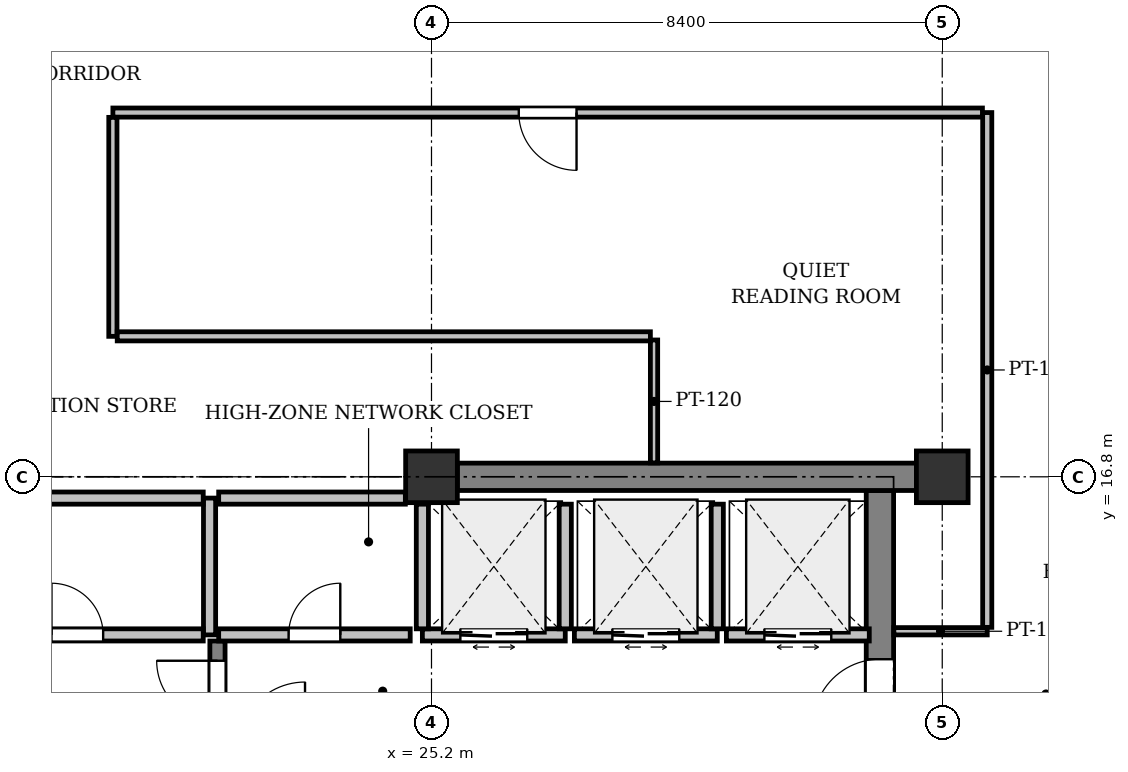
"""IFC4 building model, lengths in metres.
Left out: names, types, materials, properties, quantities, classifications, styles, units other than length and angle.
Written with IfcOpenShell. Run it as: python <this file> out.ifc"""

import sys

from ifc_helpers import new_model, si_unit, direction, frame, frame_2d, origin, origin_2d, place, context, subcontext, project, spatial, rectangle, extrude, element, fill, save


model = new_model("IFC4")
c1 = context("Model", 3, precision=1e-05, world=origin(), true_north=direction((0.0, 1.0)))
c2 = subcontext(c1, "Body", "Model", "MODEL_VIEW")
j1 = project(units=[si_unit("LENGTHUNIT", "METRE"), si_unit("PLANEANGLEUNIT", "RADIAN")], contexts=[c1])
p1 = place(None, origin())
s1 = spatial("IfcSite", under=j1, at=p1, CompositionType="ELEMENT")
p2 = place(p1, origin())
s2 = spatial("IfcBuilding", under=s1, at=p2, CompositionType="ELEMENT")
p3 = place(p2, frame((0.0, 0.0, 274.2)))
s3 = spatial("IfcBuildingStorey", under=s2, at=p3, CompositionType="ELEMENT", Elevation=274.2)
for number, where, z_axis, x_axis in (
    (1, (25.2, 16.8, 0.0), (0.0, 0.0, 1.0), (1.0, 0.0, 0.0)),
    (2, (33.6, 16.8, 0.0), (0.0, 0.0, 1.0), (1.0, 0.0, 0.0)),
):
    element("IfcColumn", number, at=place(p3, frame(where, z_axis=z_axis, x_axis=x_axis)), inside=s3, PredefinedType="COLUMN", context=c2, shape_type="SweptSolid", body=[
        extrude(rectangle(XDim=0.85, YDim=0.85, at=origin_2d()), origin(), (0.0, 0.0, 1.0), 4.0),
    ])
p4 = place(p3, frame((32.575, 8.625, 0.0), z_axis=(0.0, 0.0, 1.0), x_axis=(0.0, 1.0, 0.0)))
e3 = element("IfcWall", 3, at=p4, inside=s3, PredefinedType="SHEAR", context=c2, shape_type="SweptSolid", body=[
    extrude(rectangle(XDim=7.95, YDim=0.45, at=frame_2d((3.975, 0.0))), origin(), (0.0, 0.0, 1.0), 3.725),
])
p5 = place(p4, frame((4.075, 0.0, 0.0)))
e4 = element("IfcOpeningElement", 4, at=p5, cuts=e3, PredefinedType="OPENING", context=c2, shape_type="SweptSolid", body=[
    extrude(rectangle(XDim=1.1, YDim=2.15, at=frame_2d((0.55, 1.075))), frame((0.0, 0.235, 0.0), z_axis=(0.0, -1.0, 0.0), x_axis=(1.0, 0.0, 0.0)), (0.0, 0.0, 1.0), 0.47),
])
p6 = place(p3, frame((25.625, 16.8, 0.0), z_axis=(0.0, 0.0, 1.0), x_axis=(1.0, 0.0, 0.0)))
e5 = element("IfcWall", 5, at=p6, inside=s3, PredefinedType="SHEAR", context=c2, shape_type="SweptSolid", body=[
    extrude(rectangle(XDim=7.55, YDim=0.45, at=frame_2d((3.775, 0.0))), origin(), (0.0, 0.0, 1.0), 3.725),
])
p7 = place(p3, frame((21.68, 12.45, 0.0), z_axis=(0.0, 0.0, 1.0), x_axis=(0.0, 1.0, 0.0)))
e6 = element("IfcWall", 6, at=p7, inside=s3, PredefinedType="SHEAR", context=c2, shape_type="SweptSolid", body=[
    extrude(rectangle(XDim=1.65, YDim=0.25, at=frame_2d((0.825, 0.0))), origin(), (0.0, 0.0, 1.0), 3.725),
])
p8 = place(p7, frame((0.325, 0.0, 0.0)))
e7 = element("IfcOpeningElement", 7, at=p8, cuts=e6, PredefinedType="OPENING", context=c2, shape_type="SweptSolid", body=[
    extrude(rectangle(XDim=1.0, YDim=2.15, at=frame_2d((0.5, 1.075))), frame((0.0, 0.135, 0.0), z_axis=(0.0, -1.0, 0.0), x_axis=(1.0, 0.0, 0.0)), (0.0, 0.0, 1.0), 0.27),
])
p9 = place(p3, frame((25.05, 14.2, 0.0), z_axis=(0.0, 0.0, 1.0), x_axis=(1.0, 0.0, 0.0)))
e8 = element("IfcWall", 8, at=p9, inside=s3, PredefinedType="PARTITIONING", context=c2, shape_type="SweptSolid", body=[
    extrude(rectangle(XDim=2.35, YDim=0.2, at=frame_2d((1.175, 0.0))), origin(), (0.0, 0.0, 1.0), 3.725),
])
p10 = place(p9, frame((0.625, 0.0, 0.0)))
e9 = element("IfcOpeningElement", 9, at=p10, cuts=e8, PredefinedType="OPENING", context=c2, shape_type="SweptSolid", body=[
    extrude(rectangle(XDim=1.1, YDim=2.2, at=frame_2d((0.55, 1.1))), frame((0.0, 0.11, 0.0), z_axis=(0.0, -1.0, 0.0), x_axis=(1.0, 0.0, 0.0)), (0.0, 0.0, 1.0), 0.22),
])
for number, where, z_axis, x_axis in (
    (10, (27.4, 14.3, 0.0), (0.0, 0.0, 1.0), (0.0, 1.0, 0.0)),
    (11, (25.05, 14.3, 0.0), (0.0, 0.0, 1.0), (0.0, 1.0, 0.0)),
):
    element("IfcWall", number, at=place(p3, frame(where, z_axis=z_axis, x_axis=x_axis)), inside=s3, PredefinedType="PARTITIONING", context=c2, shape_type="SweptSolid", body=[
        extrude(rectangle(XDim=2.05, YDim=0.2, at=frame_2d((1.025, 0.0))), origin(), (0.0, 0.0, 1.0), 3.725),
    ])
p11 = place(p3, frame((27.55, 14.2, 0.0), z_axis=(0.0, 0.0, 1.0), x_axis=(1.0, 0.0, 0.0)))
e12 = element("IfcWall", 12, at=p11, inside=s3, PredefinedType="PARTITIONING", context=c2, shape_type="SweptSolid", body=[
    extrude(rectangle(XDim=2.35, YDim=0.2, at=frame_2d((1.175, 0.0))), origin(), (0.0, 0.0, 1.0), 3.725),
])
p12 = place(p11, frame((0.625, 0.0, 0.0)))
e13 = element("IfcOpeningElement", 13, at=p12, cuts=e12, PredefinedType="OPENING", context=c2, shape_type="SweptSolid", body=[
    extrude(rectangle(XDim=1.1, YDim=2.2, at=frame_2d((0.55, 1.1))), frame((0.0, 0.11, 0.0), z_axis=(0.0, -1.0, 0.0), x_axis=(1.0, 0.0, 0.0)), (0.0, 0.0, 1.0), 0.22),
])
p13 = place(p3, frame((29.9, 14.3, 0.0), z_axis=(0.0, 0.0, 1.0), x_axis=(0.0, 1.0, 0.0)))
e14 = element("IfcWall", 14, at=p13, inside=s3, PredefinedType="PARTITIONING", context=c2, shape_type="SweptSolid", body=[
    extrude(rectangle(XDim=2.05, YDim=0.2, at=frame_2d((1.025, 0.0))), origin(), (0.0, 0.0, 1.0), 3.725),
])
p14 = place(p3, frame((30.05, 14.2, 0.0), z_axis=(0.0, 0.0, 1.0), x_axis=(1.0, 0.0, 0.0)))
e15 = element("IfcWall", 15, at=p14, inside=s3, PredefinedType="PARTITIONING", context=c2, shape_type="SweptSolid", body=[
    extrude(rectangle(XDim=2.35, YDim=0.2, at=frame_2d((1.175, 0.0))), origin(), (0.0, 0.0, 1.0), 3.725),
])
p15 = place(p14, frame((0.625, 0.0, 0.0)))
e16 = element("IfcOpeningElement", 16, at=p15, cuts=e15, PredefinedType="OPENING", context=c2, shape_type="SweptSolid", body=[
    extrude(rectangle(XDim=1.1, YDim=2.2, at=frame_2d((0.55, 1.1))), frame((0.0, 0.11, 0.0), z_axis=(0.0, -1.0, 0.0), x_axis=(1.0, 0.0, 0.0)), (0.0, 0.0, 1.0), 0.22),
])
p16 = place(p3, frame((21.55, 14.2, 0.0), z_axis=(0.0, 0.0, 1.0), x_axis=(0.0, 1.0, 0.0)))
e17 = element("IfcWall", 17, at=p16, inside=s3, PredefinedType="PARTITIONING", context=c2, shape_type="SweptSolid", body=[
    extrude(rectangle(XDim=2.25, YDim=0.2, at=frame_2d((1.125, 0.0))), origin(), (0.0, 0.0, 1.0), 3.725),
])
p17 = place(p3, frame((21.446, 16.45, 0.0), z_axis=(0.0, 0.0, 1.0), x_axis=(-1.0, 0.0, 0.0)))
e18 = element("IfcWall", 18, at=p17, inside=s3, PredefinedType="PARTITIONING", context=c2, shape_type="SweptSolid", body=[
    extrude(rectangle(XDim=4.216, YDim=0.2, at=frame_2d((2.108, 0.0))), origin(), (0.0, 0.0, 1.0), 3.725),
])
p18 = place(p3, frame((17.304, 14.2, 0.0), z_axis=(0.0, 0.0, 1.0), x_axis=(1.0, 0.0, 0.0)))
e19 = element("IfcWall", 19, at=p18, inside=s3, PredefinedType="PARTITIONING", context=c2, shape_type="SweptSolid", body=[
    extrude(rectangle(XDim=4.142, YDim=0.2, at=frame_2d((2.071, 0.0))), origin(), (0.0, 0.0, 1.0), 3.725),
])
p19 = place(p18, frame((1.646, 0.0, 0.0)))
e20 = element("IfcOpeningElement", 20, at=p19, cuts=e19, PredefinedType="OPENING", context=c2, shape_type="SweptSolid", body=[
    extrude(rectangle(XDim=0.85, YDim=2.15, at=frame_2d((0.425, 1.075))), frame((0.0, 0.11, 0.0), z_axis=(0.0, -1.0, 0.0), x_axis=(1.0, 0.0, 0.0)), (0.0, 0.0, 1.0), 0.22),
])
p20 = place(p3, frame((24.77, 16.45, 0.0), z_axis=(0.0, 0.0, 1.0), x_axis=(-1.0, 0.0, 0.0)))
e21 = element("IfcWall", 21, at=p20, inside=s3, PredefinedType="PARTITIONING", context=c2, shape_type="SweptSolid", body=[
    extrude(rectangle(XDim=3.07, YDim=0.2, at=frame_2d((1.535, 0.0))), origin(), (0.0, 0.0, 1.0), 3.725),
])
p21 = place(p3, frame((21.7, 14.2, 0.0), z_axis=(0.0, 0.0, 1.0), x_axis=(1.0, 0.0, 0.0)))
e22 = element("IfcWall", 22, at=p21, inside=s3, PredefinedType="PARTITIONING", context=c2, shape_type="SweptSolid", body=[
    extrude(rectangle(XDim=3.15, YDim=0.2, at=frame_2d((1.575, 0.0))), origin(), (0.0, 0.0, 1.0), 3.725),
])
p22 = place(p21, frame((1.15, 0.0, 0.0)))
e23 = element("IfcOpeningElement", 23, at=p22, cuts=e22, PredefinedType="OPENING", context=c2, shape_type="SweptSolid", body=[
    extrude(rectangle(XDim=0.85, YDim=2.15, at=frame_2d((0.425, 1.075))), frame((0.0, 0.11, 0.0), z_axis=(0.0, -1.0, 0.0), x_axis=(1.0, 0.0, 0.0)), (0.0, 0.0, 1.0), 0.22),
])
p23 = place(p3, frame((28.86, 19.05, 0.0), z_axis=(0.0, 0.0, 1.0), x_axis=(0.0, -1.0, 0.0)))
e24 = element("IfcWall", 24, at=p23, inside=s3, PredefinedType="PARTITIONING", context=c2, shape_type="SweptSolid", body=[
    extrude(rectangle(XDim=2.021, YDim=0.12, at=frame_2d((1.01, 0.0))), origin(), (0.0, 0.0, 1.0), 3.725),
])
p24 = place(p3, frame((32.804, 14.26, 0.0), z_axis=(0.0, 0.0, 1.0), x_axis=(1.0, 0.0, 0.0)))
e25 = element("IfcWall", 25, at=p24, inside=s3, PredefinedType="PARTITIONING", context=c2, shape_type="SweptSolid", body=[
    extrude(rectangle(XDim=1.536, YDim=0.12, at=frame_2d((0.768, 0.0))), origin(), (0.0, 0.0, 1.0), 3.319),
])
p25 = place(p3, frame((34.34, 14.324, 0.0), z_axis=(0.0, 0.0, 1.0), x_axis=(0.0, 1.0, 0.0)))
e26 = element("IfcWall", 26, at=p25, inside=s3, PredefinedType="PARTITIONING", context=c2, shape_type="SweptSolid", body=[
    extrude(rectangle(XDim=8.466, YDim=0.15, at=frame_2d((4.233, 0.0))), origin(), (0.0, 0.0, 1.0), 3.271),
])
p26 = place(p3, frame((34.261, 22.79, 0.0), z_axis=(0.0, 0.0, 1.0), x_axis=(-1.0, 0.0, 0.0)))
e27 = element("IfcWall", 27, at=p26, inside=s3, PredefinedType="PARTITIONING", context=c2, shape_type="SweptSolid", body=[
    extrude(rectangle(XDim=14.301, YDim=0.15, at=frame_2d((7.15, 0.0))), origin(), (0.0, 0.0, 1.0), 3.319),
])
p27 = place(p26, frame((6.676, 0.0, 0.0)))
e28 = element("IfcOpeningElement", 28, at=p27, cuts=e27, PredefinedType="OPENING", context=c2, shape_type="SweptSolid", body=[
    extrude(rectangle(XDim=0.95, YDim=2.15, at=frame_2d((0.475, 1.075))), frame((0.0, 0.085, 0.0), z_axis=(0.0, -1.0, 0.0), x_axis=(1.0, 0.0, 0.0)), (0.0, 0.0, 1.0), 0.17),
])
p28 = place(p3, frame((19.96, 22.711, 0.0), z_axis=(0.0, 0.0, 1.0), x_axis=(0.0, -1.0, 0.0)))
e29 = element("IfcWall", 29, at=p28, inside=s3, PredefinedType="PARTITIONING", context=c2, shape_type="SweptSolid", body=[
    extrude(rectangle(XDim=3.601, YDim=0.135, at=frame_2d((1.8, 0.0))), origin(), (0.0, 0.0, 1.0), 3.725),
])
p29 = place(p3, frame((20.031, 19.11, 0.0), z_axis=(0.0, 0.0, 1.0), x_axis=(1.0, 0.0, 0.0)))
e30 = element("IfcWall", 30, at=p29, inside=s3, PredefinedType="PARTITIONING", context=c2, shape_type="SweptSolid", body=[
    extrude(rectangle(XDim=8.769, YDim=0.15, at=frame_2d((4.384, 0.0))), origin(), (0.0, 0.0, 1.0), 3.319),
])
p30 = place(p5, origin())
e31 = element("IfcDoor", 31, at=p30, inside=s3, OperationType="SINGLE_SWING_LEFT", PredefinedType="DOOR", context=c2, shape_type="SweptSolid", body=[
    extrude(rectangle(XDim=1.1, YDim=2.15, at=frame_2d((0.55, 1.075))), frame((0.0, 0.025, 0.0), z_axis=(0.0, -1.0, 0.0), x_axis=(1.0, 0.0, 0.0)), (0.0, 0.0, 1.0), 0.05),
])
fill(e4, e31)
p31 = place(p8, origin())
e32 = element("IfcDoor", 32, at=p31, inside=s3, OperationType="SINGLE_SWING_RIGHT", PredefinedType="DOOR", context=c2, shape_type="SweptSolid", body=[
    extrude(rectangle(XDim=1.0, YDim=2.15, at=frame_2d((0.5, 1.075))), frame((0.0, 0.025, 0.0), z_axis=(0.0, -1.0, 0.0), x_axis=(1.0, 0.0, 0.0)), (0.0, 0.0, 1.0), 0.05),
])
fill(e7, e32)
p32 = place(p10, origin())
e33 = element("IfcDoor", 33, at=p32, inside=s3, OperationType="DOUBLE_DOOR_SLIDING", PredefinedType="DOOR", context=c2, shape_type="SweptSolid", body=[
    extrude(rectangle(XDim=1.1, YDim=2.2, at=frame_2d((0.55, 1.1))), frame((0.0, 0.025, 0.0), z_axis=(0.0, -1.0, 0.0), x_axis=(1.0, 0.0, 0.0)), (0.0, 0.0, 1.0), 0.05),
])
fill(e9, e33)
p33 = place(p12, origin())
e34 = element("IfcDoor", 34, at=p33, inside=s3, OperationType="DOUBLE_DOOR_SLIDING", PredefinedType="DOOR", context=c2, shape_type="SweptSolid", body=[
    extrude(rectangle(XDim=1.1, YDim=2.2, at=frame_2d((0.55, 1.1))), frame((0.0, 0.025, 0.0), z_axis=(0.0, -1.0, 0.0), x_axis=(1.0, 0.0, 0.0)), (0.0, 0.0, 1.0), 0.05),
])
fill(e13, e34)
p34 = place(p15, origin())
e35 = element("IfcDoor", 35, at=p34, inside=s3, OperationType="DOUBLE_DOOR_SLIDING", PredefinedType="DOOR", context=c2, shape_type="SweptSolid", body=[
    extrude(rectangle(XDim=1.1, YDim=2.2, at=frame_2d((0.55, 1.1))), frame((0.0, 0.025, 0.0), z_axis=(0.0, -1.0, 0.0), x_axis=(1.0, 0.0, 0.0)), (0.0, 0.0, 1.0), 0.05),
])
fill(e16, e35)
p35 = place(p19, origin())
e36 = element("IfcDoor", 36, at=p35, inside=s3, OperationType="SINGLE_SWING_LEFT", PredefinedType="DOOR", context=c2, shape_type="SweptSolid", body=[
    extrude(rectangle(XDim=0.85, YDim=2.15, at=frame_2d((0.425, 1.075))), frame((0.0, 0.025, 0.0), z_axis=(0.0, -1.0, 0.0), x_axis=(1.0, 0.0, 0.0)), (0.0, 0.0, 1.0), 0.05),
])
fill(e20, e36)
p36 = place(p22, origin())
e37 = element("IfcDoor", 37, at=p36, inside=s3, OperationType="SINGLE_SWING_RIGHT", PredefinedType="DOOR", context=c2, shape_type="SweptSolid", body=[
    extrude(rectangle(XDim=0.85, YDim=2.15, at=frame_2d((0.425, 1.075))), frame((0.0, 0.025, 0.0), z_axis=(0.0, -1.0, 0.0), x_axis=(1.0, 0.0, 0.0)), (0.0, 0.0, 1.0), 0.05),
])
fill(e23, e37)
p37 = place(p27, origin())
e38 = element("IfcDoor", 38, at=p37, inside=s3, OperationType="SINGLE_SWING_LEFT", PredefinedType="DOOR", context=c2, shape_type="SweptSolid", body=[
    extrude(rectangle(XDim=0.95, YDim=2.15, at=frame_2d((0.475, 1.075))), frame((0.0, 0.025, 0.0), z_axis=(0.0, -1.0, 0.0), x_axis=(1.0, 0.0, 0.0)), (0.0, 0.0, 1.0), 0.05),
])
fill(e28, e38)
save(model, sys.argv[1])
